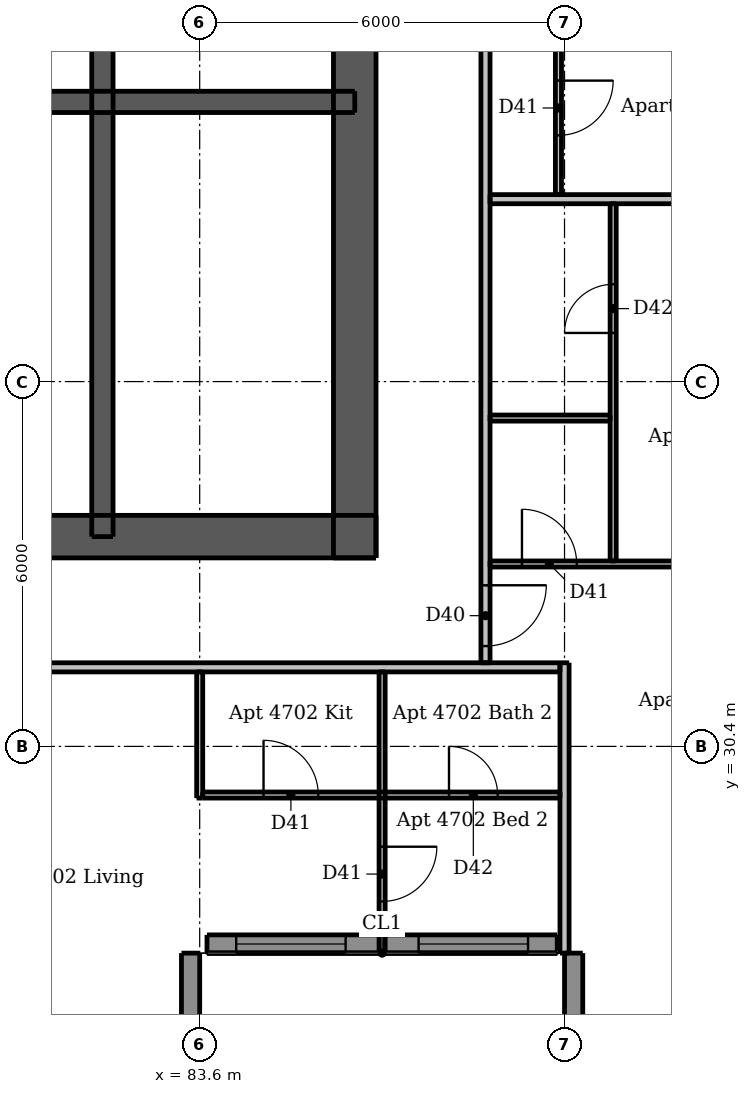
"""IFC4 building model, lengths in metres.
Left out: names, types, materials, properties, quantities, classifications, styles, units other than length and angle.
Written with IfcOpenShell. Run it as: python <this file> out.ifc"""

import sys

from ifc_helpers import new_model, si_unit, direction, frame, frame_2d, origin, place, context, subcontext, project, spatial, rectangle, extrude, element, fill, save


model = new_model("IFC4")
c1 = context("Model", 3, precision=1e-05, world=origin(), true_north=direction((0.0, 1.0)))
c2 = subcontext(c1, "Body", "Model", "MODEL_VIEW")
j1 = project(units=[si_unit("LENGTHUNIT", "METRE"), si_unit("PLANEANGLEUNIT", "RADIAN")], contexts=[c1])
p1 = place(None, origin())
s1 = spatial("IfcSite", under=j1, at=p1, CompositionType="ELEMENT")
p2 = place(p1, origin())
s2 = spatial("IfcBuilding", under=s1, at=p2, CompositionType="ELEMENT")
p3 = place(p2, frame((0.0, 0.0, 174.7)))
s3 = spatial("IfcBuildingStorey", under=s2, at=p3, CompositionType="ELEMENT", Elevation=174.7)
p4 = place(p3, frame((62.5, 33.85, 0.0), z_axis=(0.0, 0.0, 1.0), x_axis=(1.0, 0.0, 0.0)))
e1 = element("IfcWall", 1, at=p4, inside=s3, PredefinedType="SHEAR", context=c2, shape_type="SweptSolid", body=[
    extrude(rectangle(XDim=24.0, YDim=0.7, at=frame_2d((12.0, 0.0))), origin(), (0.0, 0.0, 1.0), 2.95),
])
p5 = place(p4, frame((1.962, 0.0, 0.0)))
e2 = element("IfcOpeningElement", 2, at=p5, cuts=e1, PredefinedType="OPENING", context=c2, shape_type="SweptSolid", body=[
    extrude(rectangle(XDim=1.1, YDim=2.1, at=frame_2d((0.55, 1.05))), frame((0.0, 0.36, 0.0), z_axis=(0.0, -1.0, 0.0), x_axis=(1.0, 0.0, 0.0)), (0.0, 0.0, 1.0), 0.72),
])
p6 = place(p4, frame((20.938, 0.0, 0.0)))
e3 = element("IfcOpeningElement", 3, at=p6, cuts=e1, PredefinedType="OPENING", context=c2, shape_type="SweptSolid", body=[
    extrude(rectangle(XDim=1.1, YDim=2.1, at=frame_2d((0.55, 1.05))), frame((0.0, 0.36, 0.0), z_axis=(0.0, -1.0, 0.0), x_axis=(1.0, 0.0, 0.0)), (0.0, 0.0, 1.0), 0.72),
])
p7 = place(p4, frame((8.0, 0.0, 0.0)))
e4 = element("IfcOpeningElement", 4, at=p7, cuts=e1, PredefinedType="OPENING", context=c2, shape_type="SweptSolid", body=[
    extrude(rectangle(XDim=1.1, YDim=2.1, at=frame_2d((0.55, 1.05))), frame((0.0, 0.36, 0.0), z_axis=(0.0, -1.0, 0.0), x_axis=(1.0, 0.0, 0.0)), (0.0, 0.0, 1.0), 0.72),
])
p8 = place(p4, frame((16.375, 0.0, 0.0)))
e5 = element("IfcOpeningElement", 5, at=p8, cuts=e1, PredefinedType="OPENING", context=c2, shape_type="SweptSolid", body=[
    extrude(rectangle(XDim=0.9, YDim=2.1, at=frame_2d((0.45, 1.05))), frame((0.0, 0.36, 0.0), z_axis=(0.0, -1.0, 0.0), x_axis=(1.0, 0.0, 0.0)), (0.0, 0.0, 1.0), 0.72),
])
p9 = place(p3, frame((86.15, 33.5, 0.0), z_axis=(0.0, 0.0, 1.0), x_axis=(0.0, 1.0, 0.0)))
e6 = element("IfcWall", 6, at=p9, inside=s3, PredefinedType="SHEAR", context=c2, shape_type="SweptSolid", body=[
    extrude(rectangle(XDim=24.0, YDim=0.7, at=frame_2d((12.0, 0.0))), origin(), (0.0, 0.0, 1.0), 2.95),
])
p10 = place(p9, frame((11.2, 0.0, 0.0)))
e7 = element("IfcOpeningElement", 7, at=p10, cuts=e6, PredefinedType="OPENING", context=c2, shape_type="SweptSolid", body=[
    extrude(rectangle(XDim=1.6, YDim=2.1, at=frame_2d((0.8, 1.05))), frame((0.0, 0.36, 0.0), z_axis=(0.0, -1.0, 0.0), x_axis=(1.0, 0.0, 0.0)), (0.0, 0.0, 1.0), 0.72),
])
p11 = place(p3, frame((62.85, 41.0, 0.0), z_axis=(0.0, 0.0, 1.0), x_axis=(1.0, 0.0, 0.0)))
e8 = element("IfcWall", 8, at=p11, inside=s3, PredefinedType="SHEAR", context=c2, shape_type="SweptSolid", body=[
    extrude(rectangle(XDim=23.3, YDim=0.35, at=frame_2d((11.65, 0.0))), origin(), (0.0, 0.0, 1.0), 2.95),
])
p12 = place(p3, frame((82.0, 33.85, 0.0), z_axis=(0.0, 0.0, 1.0), x_axis=(0.0, 1.0, 0.0)))
e9 = element("IfcWall", 9, at=p12, inside=s3, PredefinedType="SHEAR", context=c2, shape_type="SweptSolid", body=[
    extrude(rectangle(XDim=10.05, YDim=0.35, at=frame_2d((5.025, 0.0))), origin(), (0.0, 0.0, 1.0), 2.95),
])
for number, where, z_axis, x_axis in (
    (10, (83.45, 25.3, 0.0), (0.0, 0.0, 1.0), (0.0, 1.0, 0.0)),
    (11, (89.75, 27.0, 0.0), (0.0, 0.0, 1.0), (0.0, -1.0, 0.0)),
):
    element("IfcWall", number, at=place(p3, frame(where, z_axis=z_axis, x_axis=x_axis)), inside=s3, PredefinedType="SOLIDWALL", context=c2, shape_type="SweptSolid", body=[
        extrude(rectangle(XDim=1.7, YDim=0.3, at=frame_2d((0.85, 0.0))), origin(), (0.0, 0.0, 1.0), 2.95),
    ])
p13 = place(p3, frame((83.72, 27.15, 0.0), z_axis=(0.0, 0.0, 1.0), x_axis=(1.0, 0.0, 0.0)))
e12 = element("IfcWall", 12, at=p13, inside=s3, PredefinedType="SOLIDWALL", context=c2, shape_type="SweptSolid", body=[
    extrude(rectangle(XDim=5.76, YDim=0.3, at=frame_2d((2.88, 0.0))), origin(), (0.0, 0.0, 1.0), 2.95),
])
p14 = place(p13, frame((0.48, 0.0, 0.15)))
e13 = element("IfcOpeningElement", 13, at=p14, cuts=e12, PredefinedType="OPENING", context=c2, shape_type="SweptSolid", body=[
    extrude(rectangle(XDim=1.8, YDim=2.1, at=frame_2d((0.9, 1.05))), frame((0.0, 0.16, 0.0), z_axis=(0.0, -1.0, 0.0), x_axis=(1.0, 0.0, 0.0)), (0.0, 0.0, 1.0), 0.32),
])
p15 = place(p13, frame((3.48, 0.0, 0.15)))
e14 = element("IfcOpeningElement", 14, at=p15, cuts=e12, PredefinedType="OPENING", context=c2, shape_type="SweptSolid", body=[
    extrude(rectangle(XDim=1.8, YDim=2.1, at=frame_2d((0.9, 1.05))), frame((0.0, 0.16, 0.0), z_axis=(0.0, -1.0, 0.0), x_axis=(1.0, 0.0, 0.0)), (0.0, 0.0, 1.0), 0.32),
])
p16 = place(p3, frame((83.6, 29.55, 0.0), z_axis=(0.0, 0.0, 1.0), x_axis=(0.0, 1.0, 0.0)))
e15 = element("IfcWall", 15, at=p16, inside=s3, PredefinedType="PARTITIONING", context=c2, shape_type="SweptSolid", body=[
    extrude(rectangle(XDim=2.075, YDim=0.1, at=frame_2d((1.038, 0.0))), origin(), (0.0, 0.0, 1.0), 2.332),
])
p17 = place(p3, frame((86.6, 31.625, 0.0), z_axis=(0.0, 0.0, 1.0), x_axis=(0.0, -1.0, 0.0)))
e16 = element("IfcWall", 16, at=p17, inside=s3, PredefinedType="PARTITIONING", context=c2, shape_type="SweptSolid", body=[
    extrude(rectangle(XDim=4.625, YDim=0.1, at=frame_2d((2.312, 0.0))), origin(), (0.0, 0.0, 1.0), 2.95),
])
p18 = place(p17, frame((2.875, 0.0, 0.0)))
e17 = element("IfcOpeningElement", 17, at=p18, cuts=e16, PredefinedType="OPENING", context=c2, shape_type="SweptSolid", body=[
    extrude(rectangle(XDim=0.9, YDim=2.1, at=frame_2d((0.45, 1.05))), frame((0.0, 0.06, 0.0), z_axis=(0.0, -1.0, 0.0), x_axis=(1.0, 0.0, 0.0)), (0.0, 0.0, 1.0), 0.12),
])
p19 = place(p3, frame((89.5, 60.325, 0.0), z_axis=(0.0, 0.0, 1.0), x_axis=(0.0, -1.0, 0.0)))
e18 = element("IfcWall", 18, at=p19, inside=s3, PredefinedType="PARTITIONING", context=c2, shape_type="SweptSolid", body=[
    extrude(rectangle(XDim=20.85, YDim=0.1, at=frame_2d((10.425, 0.0))), origin(), (0.0, 0.0, 1.0), 2.332),
])
p20 = place(p19, frame((9.675, 0.0, 0.0)))
e19 = element("IfcOpeningElement", 19, at=p20, cuts=e18, PredefinedType="OPENING", context=c2, shape_type="SweptSolid", body=[
    extrude(rectangle(XDim=0.9, YDim=2.1, at=frame_2d((0.45, 1.05))), frame((0.0, 0.06, 0.0), z_axis=(0.0, -1.0, 0.0), x_axis=(1.0, 0.0, 0.0)), (0.0, 0.0, 1.0), 0.12),
])
p21 = place(p19, frame((6.675, 0.0, 0.0)))
e20 = element("IfcOpeningElement", 20, at=p21, cuts=e18, PredefinedType="OPENING", context=c2, shape_type="SweptSolid", body=[
    extrude(rectangle(XDim=0.9, YDim=2.1, at=frame_2d((0.45, 1.05))), frame((0.0, 0.06, 0.0), z_axis=(0.0, -1.0, 0.0), x_axis=(1.0, 0.0, 0.0)), (0.0, 0.0, 1.0), 0.12),
])
p22 = place(p19, frame((18.975, 0.0, 0.0)))
e21 = element("IfcOpeningElement", 21, at=p22, cuts=e18, PredefinedType="OPENING", context=c2, shape_type="SweptSolid", body=[
    extrude(rectangle(XDim=0.9, YDim=2.1, at=frame_2d((0.45, 1.05))), frame((0.0, 0.06, 0.0), z_axis=(0.0, -1.0, 0.0), x_axis=(1.0, 0.0, 0.0)), (0.0, 0.0, 1.0), 0.12),
])
p23 = place(p19, frame((15.975, 0.0, 0.0)))
e22 = element("IfcOpeningElement", 22, at=p23, cuts=e18, PredefinedType="OPENING", context=c2, shape_type="SweptSolid", body=[
    extrude(rectangle(XDim=0.9, YDim=2.1, at=frame_2d((0.45, 1.05))), frame((0.0, 0.06, 0.0), z_axis=(0.0, -1.0, 0.0), x_axis=(1.0, 0.0, 0.0)), (0.0, 0.0, 1.0), 0.12),
])
p24 = place(p19, frame((12.975, 0.0, 0.0)))
e23 = element("IfcOpeningElement", 23, at=p24, cuts=e18, PredefinedType="OPENING", context=c2, shape_type="SweptSolid", body=[
    extrude(rectangle(XDim=0.9, YDim=2.1, at=frame_2d((0.45, 1.05))), frame((0.0, 0.06, 0.0), z_axis=(0.0, -1.0, 0.0), x_axis=(1.0, 0.0, 0.0)), (0.0, 0.0, 1.0), 0.12),
])
p25 = place(p19, frame((1.275, 0.0, 0.0)))
e24 = element("IfcOpeningElement", 24, at=p25, cuts=e18, PredefinedType="OPENING", context=c2, shape_type="SweptSolid", body=[
    extrude(rectangle(XDim=0.9, YDim=2.1, at=frame_2d((0.45, 1.05))), frame((0.0, 0.06, 0.0), z_axis=(0.0, -1.0, 0.0), x_axis=(1.0, 0.0, 0.0)), (0.0, 0.0, 1.0), 0.12),
])
p26 = place(p19, frame((4.325, 0.0, 0.0)))
e25 = element("IfcOpeningElement", 25, at=p26, cuts=e18, PredefinedType="OPENING", context=c2, shape_type="SweptSolid", body=[
    extrude(rectangle(XDim=0.8, YDim=2.1, at=frame_2d((0.4, 1.05))), frame((0.0, 0.06, 0.0), z_axis=(0.0, -1.0, 0.0), x_axis=(1.0, 0.0, 0.0)), (0.0, 0.0, 1.0), 0.12),
])
p27 = place(p3, frame((90.4, 33.45, 0.0), z_axis=(0.0, 0.0, 1.0), x_axis=(0.0, 1.0, 0.0)))
e26 = element("IfcWall", 26, at=p27, inside=s3, PredefinedType="PARTITIONING", context=c2, shape_type="SweptSolid", body=[
    extrude(rectangle(XDim=5.875, YDim=0.1, at=frame_2d((2.938, 0.0))), origin(), (0.0, 0.0, 1.0), 2.95),
])
p28 = place(p27, frame((3.75, 0.0, 0.0)))
e27 = element("IfcOpeningElement", 27, at=p28, cuts=e26, PredefinedType="OPENING", context=c2, shape_type="SweptSolid", body=[
    extrude(rectangle(XDim=0.8, YDim=2.1, at=frame_2d((0.4, 1.05))), frame((0.0, 0.06, 0.0), z_axis=(0.0, -1.0, 0.0), x_axis=(1.0, 0.0, 0.0)), (0.0, 0.0, 1.0), 0.12),
])
p29 = place(p3, frame((88.375, 35.8, 0.0), z_axis=(0.0, 0.0, 1.0), x_axis=(1.0, 0.0, 0.0)))
e28 = element("IfcWall", 28, at=p29, inside=s3, PredefinedType="PARTITIONING", context=c2, shape_type="SweptSolid", body=[
    extrude(rectangle(XDim=1.975, YDim=0.1, at=frame_2d((0.988, 0.0))), origin(), (0.0, 0.0, 1.0), 2.95),
])
p30 = place(p3, frame((88.375, 33.4, 0.0), z_axis=(0.0, 0.0, 1.0), x_axis=(1.0, 0.0, 0.0)))
e29 = element("IfcWall", 29, at=p30, inside=s3, PredefinedType="PARTITIONING", context=c2, shape_type="SweptSolid", body=[
    extrude(rectangle(XDim=7.625, YDim=0.1, at=frame_2d((3.812, 0.0))), origin(), (0.0, 0.0, 1.0), 2.95),
])
p31 = place(p30, frame((0.525, 0.0, 0.0)))
e30 = element("IfcOpeningElement", 30, at=p31, cuts=e29, PredefinedType="OPENING", context=c2, shape_type="SweptSolid", body=[
    extrude(rectangle(XDim=0.9, YDim=2.1, at=frame_2d((0.45, 1.05))), frame((0.0, 0.06, 0.0), z_axis=(0.0, -1.0, 0.0), x_axis=(1.0, 0.0, 0.0)), (0.0, 0.0, 1.0), 0.12),
])
p32 = place(p30, frame((4.375, 0.0, 0.0)))
e31 = element("IfcOpeningElement", 31, at=p32, cuts=e29, PredefinedType="OPENING", context=c2, shape_type="SweptSolid", body=[
    extrude(rectangle(XDim=0.9, YDim=2.1, at=frame_2d((0.45, 1.05))), frame((0.0, 0.06, 0.0), z_axis=(0.0, -1.0, 0.0), x_axis=(1.0, 0.0, 0.0)), (0.0, 0.0, 1.0), 0.12),
])
p33 = place(p3, frame((83.65, 29.6, 0.0), z_axis=(0.0, 0.0, 1.0), x_axis=(1.0, 0.0, 0.0)))
e32 = element("IfcWall", 32, at=p33, inside=s3, PredefinedType="PARTITIONING", context=c2, shape_type="SweptSolid", body=[
    extrude(rectangle(XDim=5.875, YDim=0.1, at=frame_2d((2.938, 0.0))), origin(), (0.0, 0.0, 1.0), 2.95),
])
p34 = place(p33, frame((1.0, 0.0, 0.0)))
e33 = element("IfcOpeningElement", 33, at=p34, cuts=e32, PredefinedType="OPENING", context=c2, shape_type="SweptSolid", body=[
    extrude(rectangle(XDim=0.9, YDim=2.1, at=frame_2d((0.45, 1.05))), frame((0.0, 0.06, 0.0), z_axis=(0.0, -1.0, 0.0), x_axis=(1.0, 0.0, 0.0)), (0.0, 0.0, 1.0), 0.12),
])
p35 = place(p33, frame((4.05, 0.0, 0.0)))
e34 = element("IfcOpeningElement", 34, at=p35, cuts=e32, PredefinedType="OPENING", context=c2, shape_type="SweptSolid", body=[
    extrude(rectangle(XDim=0.8, YDim=2.1, at=frame_2d((0.4, 1.05))), frame((0.0, 0.06, 0.0), z_axis=(0.0, -1.0, 0.0), x_axis=(1.0, 0.0, 0.0)), (0.0, 0.0, 1.0), 0.12),
])
p36 = place(p3, frame((88.3, 61.175, 0.0), z_axis=(0.0, 0.0, 1.0), x_axis=(0.0, -1.0, 0.0)))
e35 = element("IfcWall", 35, at=p36, inside=s3, PredefinedType="PARTITIONING", context=c2, shape_type="SweptSolid", body=[
    extrude(rectangle(XDim=29.4, YDim=0.15, at=frame_2d((14.7, 0.0))), origin(), (0.0, 0.0, 1.0), 2.95),
])
p37 = place(p36, frame((28.125, 0.0, 0.0)))
e36 = element("IfcOpeningElement", 36, at=p37, cuts=e35, PredefinedType="OPENING", context=c2, shape_type="SweptSolid", body=[
    extrude(rectangle(XDim=1.0, YDim=2.1, at=frame_2d((0.5, 1.05))), frame((0.0, 0.085, 0.0), z_axis=(0.0, -1.0, 0.0), x_axis=(1.0, 0.0, 0.0)), (0.0, 0.0, 1.0), 0.17),
])
p38 = place(p36, frame((10.775, 0.0, 0.0)))
e37 = element("IfcOpeningElement", 37, at=p38, cuts=e35, PredefinedType="OPENING", context=c2, shape_type="SweptSolid", body=[
    extrude(rectangle(XDim=1.0, YDim=2.1, at=frame_2d((0.5, 1.05))), frame((0.0, 0.085, 0.0), z_axis=(0.0, -1.0, 0.0), x_axis=(1.0, 0.0, 0.0)), (0.0, 0.0, 1.0), 0.17),
])
p39 = place(p3, frame((89.6, 27.0, 0.0), z_axis=(0.0, 0.0, 1.0), x_axis=(0.0, 1.0, 0.0)))
e38 = element("IfcWall", 38, at=p39, inside=s3, PredefinedType="PARTITIONING", context=c2, shape_type="SweptSolid", body=[
    extrude(rectangle(XDim=4.775, YDim=0.15, at=frame_2d((2.387, 0.0))), origin(), (0.0, 0.0, 1.0), 2.332),
])
p40 = place(p3, frame((88.375, 39.4, 0.0), z_axis=(0.0, 0.0, 1.0), x_axis=(1.0, 0.0, 0.0)))
e39 = element("IfcWall", 39, at=p40, inside=s3, PredefinedType="PARTITIONING", context=c2, shape_type="SweptSolid", body=[
    extrude(rectangle(XDim=7.625, YDim=0.15, at=frame_2d((3.812, 0.0))), origin(), (0.0, 0.0, 1.0), 2.95),
])
p41 = place(p3, frame((89.525, 31.7, 0.0), z_axis=(0.0, 0.0, 1.0), x_axis=(-1.0, 0.0, 0.0)))
e40 = element("IfcWall", 40, at=p41, inside=s3, PredefinedType="PARTITIONING", context=c2, shape_type="SweptSolid", body=[
    extrude(rectangle(XDim=30.55, YDim=0.15, at=frame_2d((15.275, 0.0))), origin(), (0.0, 0.0, 1.0), 2.95),
])
p42 = place(p41, frame((26.775, 0.0, 0.0)))
e41 = element("IfcOpeningElement", 41, at=p42, cuts=e40, PredefinedType="OPENING", context=c2, shape_type="SweptSolid", body=[
    extrude(rectangle(XDim=1.0, YDim=2.1, at=frame_2d((0.5, 1.05))), frame((0.0, 0.085, 0.0), z_axis=(0.0, -1.0, 0.0), x_axis=(1.0, 0.0, 0.0)), (0.0, 0.0, 1.0), 0.17),
])
p43 = place(p41, frame((8.425, 0.0, 0.0)))
e42 = element("IfcOpeningElement", 42, at=p43, cuts=e40, PredefinedType="OPENING", context=c2, shape_type="SweptSolid", body=[
    extrude(rectangle(XDim=1.0, YDim=2.1, at=frame_2d((0.5, 1.05))), frame((0.0, 0.085, 0.0), z_axis=(0.0, -1.0, 0.0), x_axis=(1.0, 0.0, 0.0)), (0.0, 0.0, 1.0), 0.17),
])
p44 = place(p14, origin())
e43 = element("IfcWindow", 43, at=p44, inside=s3, PartitioningType="DOUBLE_PANEL_VERTICAL", PredefinedType="WINDOW", context=c2, shape_type="SweptSolid", body=[
    extrude(rectangle(XDim=1.8, YDim=2.1, at=frame_2d((0.9, 1.05))), frame((0.0, 0.03, 0.0), z_axis=(0.0, -1.0, 0.0), x_axis=(1.0, 0.0, 0.0)), (0.0, 0.0, 1.0), 0.06),
])
fill(e13, e43)
p45 = place(p15, origin())
e44 = element("IfcWindow", 44, at=p45, inside=s3, PartitioningType="DOUBLE_PANEL_VERTICAL", PredefinedType="WINDOW", context=c2, shape_type="SweptSolid", body=[
    extrude(rectangle(XDim=1.8, YDim=2.1, at=frame_2d((0.9, 1.05))), frame((0.0, 0.03, 0.0), z_axis=(0.0, -1.0, 0.0), x_axis=(1.0, 0.0, 0.0)), (0.0, 0.0, 1.0), 0.06),
])
fill(e14, e44)
p46 = place(p6, origin())
e45 = element("IfcDoor", 45, at=p46, inside=s3, OperationType="SINGLE_SWING_RIGHT", PredefinedType="DOOR", context=c2, shape_type="SweptSolid", body=[
    extrude(rectangle(XDim=1.1, YDim=2.1, at=frame_2d((0.55, 1.05))), frame((0.0, 0.337, 0.0), z_axis=(0.0, -1.0, 0.0), x_axis=(1.0, 0.0, 0.0)), (0.0, 0.0, 1.0), 0.05),
])
fill(e3, e45)
p47 = place(p34, origin())
e46 = element("IfcDoor", 46, at=p47, inside=s3, OperationType="SINGLE_SWING_LEFT", PredefinedType="DOOR", context=c2, shape_type="SweptSolid", body=[
    extrude(rectangle(XDim=0.9, YDim=2.1, at=frame_2d((0.45, 1.05))), frame((0.0, 0.025, 0.0), z_axis=(0.0, -1.0, 0.0), x_axis=(1.0, 0.0, 0.0)), (0.0, 0.0, 1.0), 0.05),
])
fill(e33, e46)
p48 = place(p18, origin())
e47 = element("IfcDoor", 47, at=p48, inside=s3, OperationType="SINGLE_SWING_LEFT", PredefinedType="DOOR", context=c2, shape_type="SweptSolid", body=[
    extrude(rectangle(XDim=0.9, YDim=2.1, at=frame_2d((0.45, 1.05))), frame((0.0, 0.025, 0.0), z_axis=(0.0, -1.0, 0.0), x_axis=(1.0, 0.0, 0.0)), (0.0, 0.0, 1.0), 0.05),
])
fill(e17, e47)
p49 = place(p35, origin())
e48 = element("IfcDoor", 48, at=p49, inside=s3, OperationType="SINGLE_SWING_LEFT", PredefinedType="DOOR", context=c2, shape_type="SweptSolid", body=[
    extrude(rectangle(XDim=0.8, YDim=2.1, at=frame_2d((0.4, 1.05))), frame((0.0, 0.025, 0.0), z_axis=(0.0, -1.0, 0.0), x_axis=(1.0, 0.0, 0.0)), (0.0, 0.0, 1.0), 0.05),
])
fill(e34, e48)
p50 = place(p37, origin())
e49 = element("IfcDoor", 49, at=p50, inside=s3, OperationType="SINGLE_SWING_LEFT", PredefinedType="DOOR", context=c2, shape_type="SweptSolid", body=[
    extrude(rectangle(XDim=1.0, YDim=2.1, at=frame_2d((0.5, 1.05))), frame((0.0, 0.025, 0.0), z_axis=(0.0, -1.0, 0.0), x_axis=(1.0, 0.0, 0.0)), (0.0, 0.0, 1.0), 0.05),
])
fill(e36, e49)
p51 = place(p31, origin())
e50 = element("IfcDoor", 50, at=p51, inside=s3, OperationType="SINGLE_SWING_LEFT", PredefinedType="DOOR", context=c2, shape_type="SweptSolid", body=[
    extrude(rectangle(XDim=0.9, YDim=2.1, at=frame_2d((0.45, 1.05))), frame((0.0, 0.025, 0.0), z_axis=(0.0, -1.0, 0.0), x_axis=(1.0, 0.0, 0.0)), (0.0, 0.0, 1.0), 0.05),
])
fill(e30, e50)
p52 = place(p28, origin())
e51 = element("IfcDoor", 51, at=p52, inside=s3, OperationType="SINGLE_SWING_LEFT", PredefinedType="DOOR", context=c2, shape_type="SweptSolid", body=[
    extrude(rectangle(XDim=0.8, YDim=2.1, at=frame_2d((0.4, 1.05))), frame((0.0, 0.025, 0.0), z_axis=(0.0, -1.0, 0.0), x_axis=(1.0, 0.0, 0.0)), (0.0, 0.0, 1.0), 0.05),
])
fill(e27, e51)
p53 = place(p22, origin())
e52 = element("IfcDoor", 52, at=p53, inside=s3, OperationType="SINGLE_SWING_LEFT", PredefinedType="DOOR", context=c2, shape_type="SweptSolid", body=[
    extrude(rectangle(XDim=0.9, YDim=2.1, at=frame_2d((0.45, 1.05))), frame((0.0, 0.025, 0.0), z_axis=(0.0, -1.0, 0.0), x_axis=(1.0, 0.0, 0.0)), (0.0, 0.0, 1.0), 0.05),
])
fill(e21, e52)
save(model, sys.argv[1])
